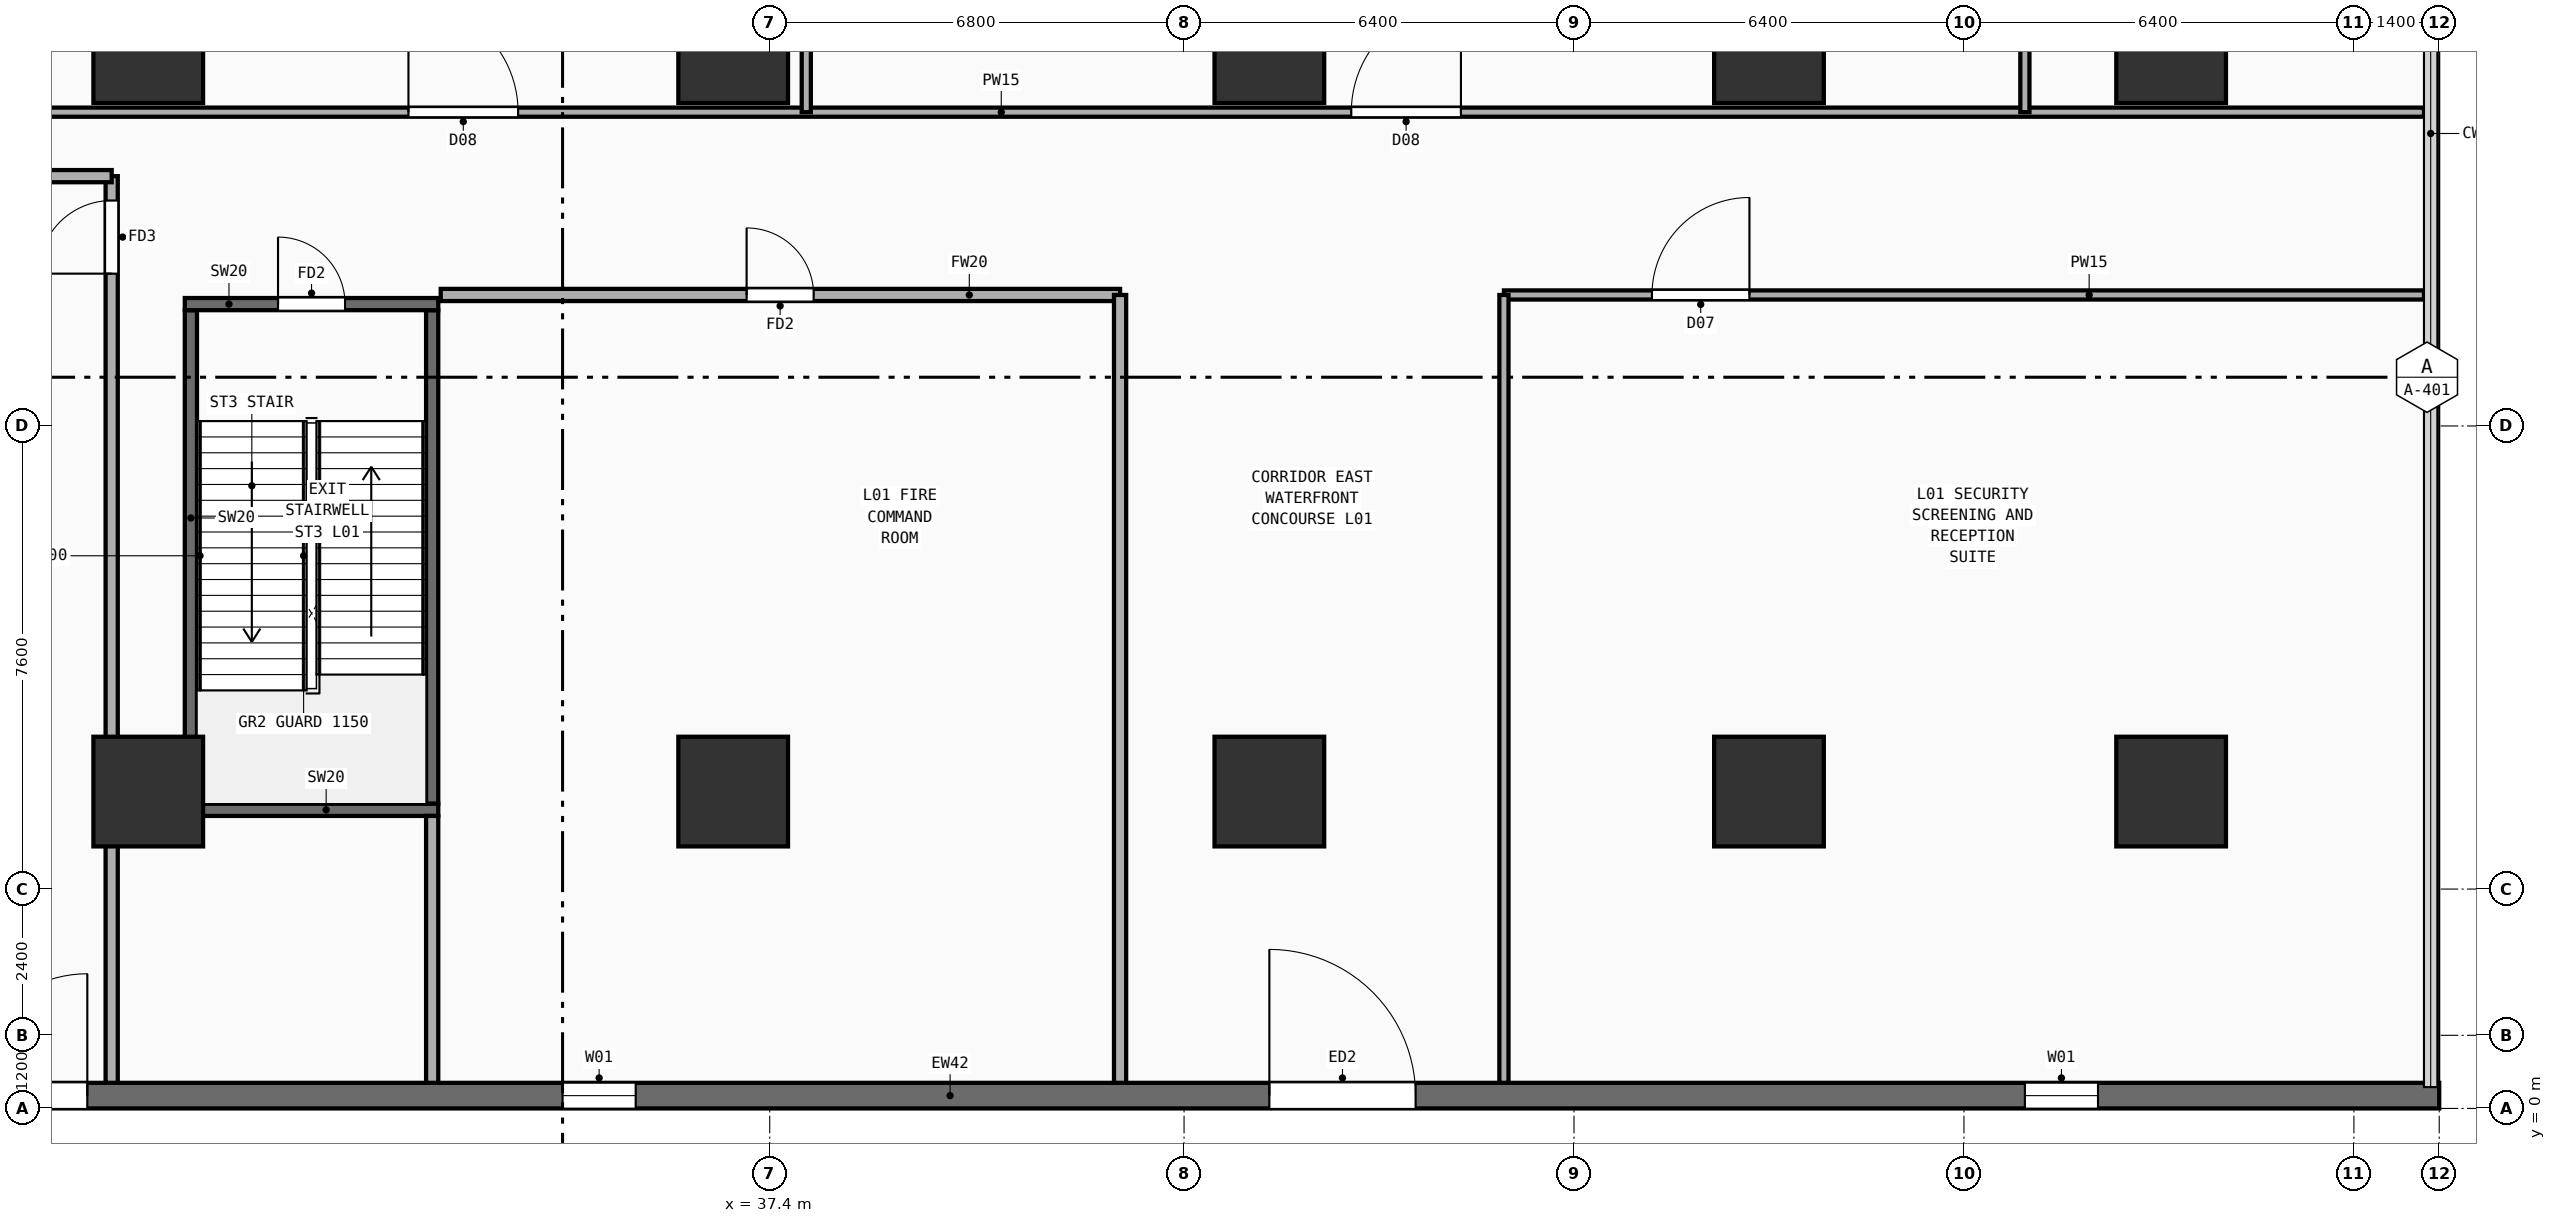
"""IFC4 building model, lengths in metres.
Left out: names, types, materials, properties, quantities, classifications, styles, units other than length and angle.
Written with IfcOpenShell. Run it as: python <this file> out.ifc"""

import sys

from ifc_helpers import new_model, si_unit, direction, frame, frame_2d, origin, origin_2d, place, context, subcontext, project, spatial, rectangle, extrude, element, fill, save


model = new_model("IFC4")
c1 = context("Model", 3, precision=1e-05, world=origin(), true_north=direction((0.0, 1.0)))
c2 = subcontext(c1, "Body", "Model", "MODEL_VIEW")
j1 = project(units=[si_unit("LENGTHUNIT", "METRE"), si_unit("PLANEANGLEUNIT", "RADIAN")], contexts=[c1])
p1 = place(None, origin())
s1 = spatial("IfcSite", under=j1, at=p1, CompositionType="ELEMENT")
p2 = place(p1, origin())
s2 = spatial("IfcBuilding", under=s1, at=p2, CompositionType="ELEMENT")
p3 = place(p2, origin())
s3 = spatial("IfcBuildingStorey", under=s2, at=p3, CompositionType="ELEMENT", Elevation=0.0)
for number, where, z_axis, x_axis in (
    (1, (27.2, 5.2, 0.0), (0.0, 0.0, 1.0), (1.0, 0.0, 0.0)),
    (2, (36.8, 5.2, 0.0), (0.0, 0.0, 1.0), (1.0, 0.0, 0.0)),
    (3, (45.6, 5.2, 0.0), (0.0, 0.0, 1.0), (1.0, 0.0, 0.0)),
    (4, (27.2, 17.4, 0.0), (0.0, 0.0, 1.0), (1.0, 0.0, 0.0)),
    (5, (36.8, 17.4, 0.0), (0.0, 0.0, 1.0), (1.0, 0.0, 0.0)),
    (6, (45.6, 17.4, 0.0), (0.0, 0.0, 1.0), (1.0, 0.0, 0.0)),
    (7, (53.8, 5.2, 0.0), (0.0, 0.0, 1.0), (1.0, 0.0, 0.0)),
    (8, (53.8, 17.4, 0.0), (0.0, 0.0, 1.0), (1.0, 0.0, 0.0)),
    (9, (60.4, 5.2, 0.0), (0.0, 0.0, 1.0), (1.0, 0.0, 0.0)),
    (10, (60.4, 17.4, 0.0), (0.0, 0.0, 1.0), (1.0, 0.0, 0.0)),
):
    element("IfcColumn", number, at=place(p3, frame(where, z_axis=z_axis, x_axis=x_axis)), inside=s3, PredefinedType="COLUMN", context=c2, shape_type="SweptSolid", body=[
        extrude(rectangle(XDim=1.8, YDim=1.8, at=origin_2d()), origin(), (0.0, 0.0, 1.0), 5.26),
    ])
p4 = place(p3, frame((0.0, 0.21, 0.0), z_axis=(0.0, 0.0, 1.0), x_axis=(1.0, 0.0, 0.0)))
e11 = element("IfcWall", 11, at=p4, inside=s3, PredefinedType="SOLIDWALL", context=c2, shape_type="SweptSolid", body=[
    extrude(rectangle(XDim=64.8, YDim=0.42, at=frame_2d((32.4, 0.0))), origin(), (0.0, 0.0, 1.0), 5.26),
])
p5 = place(p4, frame((8.0, 0.0, 0.95)))
e12 = element("IfcOpeningElement", 12, at=p5, cuts=e11, PredefinedType="OPENING", context=c2, shape_type="SweptSolid", body=[
    extrude(rectangle(XDim=1.2, YDim=1.6, at=frame_2d((0.6, 0.8))), frame((0.0, 0.22, 0.0), z_axis=(0.0, -1.0, 0.0), x_axis=(1.0, 0.0, 0.0)), (0.0, 0.0, 1.0), 0.44),
])
p6 = place(p4, frame((16.0, 0.0, 0.95)))
e13 = element("IfcOpeningElement", 13, at=p6, cuts=e11, PredefinedType="OPENING", context=c2, shape_type="SweptSolid", body=[
    extrude(rectangle(XDim=1.2, YDim=1.6, at=frame_2d((0.6, 0.8))), frame((0.0, 0.22, 0.0), z_axis=(0.0, -1.0, 0.0), x_axis=(1.0, 0.0, 0.0)), (0.0, 0.0, 1.0), 0.44),
])
p7 = place(p4, frame((34.0, 0.0, 0.95)))
e14 = element("IfcOpeningElement", 14, at=p7, cuts=e11, PredefinedType="OPENING", context=c2, shape_type="SweptSolid", body=[
    extrude(rectangle(XDim=1.2, YDim=1.6, at=frame_2d((0.6, 0.8))), frame((0.0, 0.22, 0.0), z_axis=(0.0, -1.0, 0.0), x_axis=(1.0, 0.0, 0.0)), (0.0, 0.0, 1.0), 0.44),
])
p8 = place(p4, frame((58.0, 0.0, 0.95)))
e15 = element("IfcOpeningElement", 15, at=p8, cuts=e11, PredefinedType="OPENING", context=c2, shape_type="SweptSolid", body=[
    extrude(rectangle(XDim=1.2, YDim=1.6, at=frame_2d((0.6, 0.8))), frame((0.0, 0.22, 0.0), z_axis=(0.0, -1.0, 0.0), x_axis=(1.0, 0.0, 0.0)), (0.0, 0.0, 1.0), 0.44),
])
p9 = place(p4, frame((24.2, 0.0, 0.0)))
e16 = element("IfcOpeningElement", 16, at=p9, cuts=e11, PredefinedType="OPENING", context=c2, shape_type="SweptSolid", body=[
    extrude(rectangle(XDim=2.0, YDim=2.5, at=frame_2d((1.0, 1.25))), frame((0.0, 0.22, 0.0), z_axis=(0.0, -1.0, 0.0), x_axis=(1.0, 0.0, 0.0)), (0.0, 0.0, 1.0), 0.44),
])
p10 = place(p4, frame((45.6, 0.0, 0.0)))
e17 = element("IfcOpeningElement", 17, at=p10, cuts=e11, PredefinedType="OPENING", context=c2, shape_type="SweptSolid", body=[
    extrude(rectangle(XDim=2.4, YDim=2.7, at=frame_2d((1.2, 1.35))), frame((0.0, 0.22, 0.0), z_axis=(0.0, -1.0, 0.0), x_axis=(1.0, 0.0, 0.0)), (0.0, 0.0, 1.0), 0.44),
])
for number, where, z_axis, x_axis in (
    (18, (27.9, 5.0, 0.0), (0.0, 0.0, 1.0), (0.0, 1.0, 0.0)),
    (19, (31.86, 5.0, 0.0), (0.0, 0.0, 1.0), (0.0, 1.0, 0.0)),
):
    element("IfcWall", number, at=place(p3, frame(where, z_axis=z_axis, x_axis=x_axis)), inside=s3, PredefinedType="SHEAR", context=c2, shape_type="SweptSolid", body=[
        extrude(rectangle(XDim=8.1, YDim=0.2, at=frame_2d((4.05, 0.0))), origin(), (0.0, 0.0, 1.0), 5.26),
    ])
p11 = place(p3, frame((27.8, 4.9, 0.0), z_axis=(0.0, 0.0, 1.0), x_axis=(1.0, 0.0, 0.0)))
e20 = element("IfcWall", 20, at=p11, inside=s3, PredefinedType="SHEAR", context=c2, shape_type="SweptSolid", body=[
    extrude(rectangle(XDim=4.16, YDim=0.2, at=frame_2d((2.08, 0.0))), origin(), (0.0, 0.0, 1.0), 5.26),
])
p12 = place(p3, frame((27.8, 13.2, 0.0), z_axis=(0.0, 0.0, 1.0), x_axis=(1.0, 0.0, 0.0)))
e21 = element("IfcWall", 21, at=p12, inside=s3, PredefinedType="SHEAR", context=c2, shape_type="SweptSolid", body=[
    extrude(rectangle(XDim=4.16, YDim=0.2, at=frame_2d((2.08, 0.0))), origin(), (0.0, 0.0, 1.0), 5.26),
])
p13 = place(p12, frame((1.53, 0.0, 0.0)))
e22 = element("IfcOpeningElement", 22, at=p13, cuts=e21, PredefinedType="OPENING", context=c2, shape_type="SweptSolid", body=[
    extrude(rectangle(XDim=1.1, YDim=2.2, at=frame_2d((0.55, 1.1))), frame((0.0, 0.11, 0.0), z_axis=(0.0, -1.0, 0.0), x_axis=(1.0, 0.0, 0.0)), (0.0, 0.0, 1.0), 0.22),
])
p14 = place(p3, frame((26.6, 0.42, 0.0), z_axis=(0.0, 0.0, 1.0), x_axis=(0.0, 1.0, 0.0)))
e23 = element("IfcWall", 23, at=p14, inside=s3, PredefinedType="PARTITIONING", context=c2, shape_type="SweptSolid", body=[
    extrude(rectangle(XDim=14.88, YDim=0.2, at=frame_2d((7.44, 0.0))), origin(), (0.0, 0.0, 1.0), 5.26),
])
p15 = place(p14, frame((13.28, 0.0, 0.0)))
e24 = element("IfcOpeningElement", 24, at=p15, cuts=e23, PredefinedType="OPENING", context=c2, shape_type="SweptSolid", body=[
    extrude(rectangle(XDim=1.2, YDim=2.25, at=frame_2d((0.6, 1.125))), frame((0.0, 0.11, 0.0), z_axis=(0.0, -1.0, 0.0), x_axis=(1.0, 0.0, 0.0)), (0.0, 0.0, 1.0), 0.22),
])
p16 = place(p3, frame((20.8, 15.3, 0.0), z_axis=(0.0, 0.0, 1.0), x_axis=(1.0, 0.0, 0.0)))
e25 = element("IfcWall", 25, at=p16, inside=s3, PredefinedType="PARTITIONING", context=c2, shape_type="SweptSolid", body=[
    extrude(rectangle(XDim=5.8, YDim=0.2, at=frame_2d((2.9, 0.0))), origin(), (0.0, 0.0, 1.0), 4.76),
])
p17 = place(p3, frame((23.65, 16.35, 0.0), z_axis=(0.0, 0.0, 1.0), x_axis=(1.0, 0.0, 0.0)))
e26 = element("IfcWall", 26, at=p17, inside=s3, PredefinedType="PARTITIONING", context=c2, shape_type="SweptSolid", body=[
    extrude(rectangle(XDim=40.9, YDim=0.15, at=frame_2d((20.45, 0.0))), origin(), (0.0, 0.0, 1.0), 5.26),
])
p18 = place(p17, frame((7.821, 0.0, 0.0)))
e27 = element("IfcOpeningElement", 27, at=p18, cuts=e26, PredefinedType="OPENING", context=c2, shape_type="SweptSolid", body=[
    extrude(rectangle(XDim=1.8, YDim=2.4, at=frame_2d((0.9, 1.2))), frame((0.0, 0.085, 0.0), z_axis=(0.0, -1.0, 0.0), x_axis=(1.0, 0.0, 0.0)), (0.0, 0.0, 1.0), 0.17),
])
p19 = place(p17, frame((23.294, 0.0, 0.0)))
e28 = element("IfcOpeningElement", 28, at=p19, cuts=e26, PredefinedType="OPENING", context=c2, shape_type="SweptSolid", body=[
    extrude(rectangle(XDim=1.8, YDim=2.4, at=frame_2d((0.9, 1.2))), frame((0.0, 0.085, 0.0), z_axis=(0.0, -1.0, 0.0), x_axis=(1.0, 0.0, 0.0)), (0.0, 0.0, 1.0), 0.17),
])
p20 = place(p3, frame((38.0, 16.35, 0.0), z_axis=(0.0, 0.0, 1.0), x_axis=(0.0, 1.0, 0.0)))
e29 = element("IfcWall", 29, at=p20, inside=s3, PredefinedType="PARTITIONING", context=c2, shape_type="SweptSolid", body=[
    extrude(rectangle(XDim=15.05, YDim=0.15, at=frame_2d((7.525, 0.0))), origin(), (0.0, 0.0, 1.0), 5.26),
])
p21 = place(p3, frame((32.0, 13.35, 0.0), z_axis=(0.0, 0.0, 1.0), x_axis=(1.0, 0.0, 0.0)))
e30 = element("IfcWall", 30, at=p21, inside=s3, PredefinedType="PARTITIONING", context=c2, shape_type="SweptSolid", body=[
    extrude(rectangle(XDim=11.15, YDim=0.2, at=frame_2d((5.575, 0.0))), origin(), (0.0, 0.0, 1.0), 4.76),
])
p22 = place(p21, frame((5.021, 0.0, 0.0)))
e31 = element("IfcOpeningElement", 31, at=p22, cuts=e30, PredefinedType="OPENING", context=c2, shape_type="SweptSolid", body=[
    extrude(rectangle(XDim=1.1, YDim=2.2, at=frame_2d((0.55, 1.1))), frame((0.0, 0.11, 0.0), z_axis=(0.0, -1.0, 0.0), x_axis=(1.0, 0.0, 0.0)), (0.0, 0.0, 1.0), 0.22),
])
p23 = place(p3, frame((31.86, 0.42, 0.0), z_axis=(0.0, 0.0, 1.0), x_axis=(0.0, 1.0, 0.0)))
e32 = element("IfcWall", 32, at=p23, inside=s3, PredefinedType="PARTITIONING", context=c2, shape_type="SweptSolid", body=[
    extrude(rectangle(XDim=4.38, YDim=0.2, at=frame_2d((2.19, 0.0))), origin(), (0.0, 0.0, 1.0), 5.26),
])
p24 = place(p3, frame((43.15, 0.42, 0.0), z_axis=(0.0, 0.0, 1.0), x_axis=(0.0, 1.0, 0.0)))
e33 = element("IfcWall", 33, at=p24, inside=s3, PredefinedType="PARTITIONING", context=c2, shape_type="SweptSolid", body=[
    extrude(rectangle(XDim=12.93, YDim=0.2, at=frame_2d((6.465, 0.0))), origin(), (0.0, 0.0, 1.0), 5.26),
])
p25 = place(p3, frame((49.45, 13.35, 0.0), z_axis=(0.0, 0.0, 1.0), x_axis=(1.0, 0.0, 0.0)))
e34 = element("IfcWall", 34, at=p25, inside=s3, PredefinedType="PARTITIONING", context=c2, shape_type="SweptSolid", body=[
    extrude(rectangle(XDim=15.1, YDim=0.15, at=frame_2d((7.55, 0.0))), origin(), (0.0, 0.0, 1.0), 4.76),
])
p26 = place(p25, frame((2.429, 0.0, 0.0)))
e35 = element("IfcOpeningElement", 35, at=p26, cuts=e34, PredefinedType="OPENING", context=c2, shape_type="SweptSolid", body=[
    extrude(rectangle(XDim=1.6, YDim=2.4, at=frame_2d((0.8, 1.2))), frame((0.0, 0.085, 0.0), z_axis=(0.0, -1.0, 0.0), x_axis=(1.0, 0.0, 0.0)), (0.0, 0.0, 1.0), 0.17),
])
p27 = place(p3, frame((49.45, 0.42, 0.0), z_axis=(0.0, 0.0, 1.0), x_axis=(0.0, 1.0, 0.0)))
e36 = element("IfcWall", 36, at=p27, inside=s3, PredefinedType="PARTITIONING", context=c2, shape_type="SweptSolid", body=[
    extrude(rectangle(XDim=12.93, YDim=0.15, at=frame_2d((6.465, 0.0))), origin(), (0.0, 0.0, 1.0), 5.26),
])
p28 = place(p3, frame((58.0, 16.35, 0.0), z_axis=(0.0, 0.0, 1.0), x_axis=(0.0, 1.0, 0.0)))
e37 = element("IfcWall", 37, at=p28, inside=s3, PredefinedType="PARTITIONING", context=c2, shape_type="SweptSolid", body=[
    extrude(rectangle(XDim=15.05, YDim=0.15, at=frame_2d((7.525, 0.0))), origin(), (0.0, 0.0, 1.0), 5.26),
])
p29 = place(p7, origin())
e38 = element("IfcWindow", 38, at=p29, inside=s3, PartitioningType="SINGLE_PANEL", PredefinedType="WINDOW", context=c2, shape_type="SweptSolid", body=[
    extrude(rectangle(XDim=1.2, YDim=1.6, at=frame_2d((0.6, 0.8))), frame((0.0, 0.03, 0.0), z_axis=(0.0, -1.0, 0.0), x_axis=(1.0, 0.0, 0.0)), (0.0, 0.0, 1.0), 0.06),
])
fill(e14, e38)
p30 = place(p8, origin())
e39 = element("IfcWindow", 39, at=p30, inside=s3, PartitioningType="SINGLE_PANEL", PredefinedType="WINDOW", context=c2, shape_type="SweptSolid", body=[
    extrude(rectangle(XDim=1.2, YDim=1.6, at=frame_2d((0.6, 0.8))), frame((0.0, 0.03, 0.0), z_axis=(0.0, -1.0, 0.0), x_axis=(1.0, 0.0, 0.0)), (0.0, 0.0, 1.0), 0.06),
])
fill(e15, e39)
p31 = place(p9, frame((2.0, 0.0, 0.0), z_axis=(0.0, 0.0, 1.0), x_axis=(-1.0, 0.0, 0.0)))
e40 = element("IfcDoor", 40, at=p31, inside=s3, OperationType="SINGLE_SWING_LEFT", PredefinedType="DOOR", context=c2, shape_type="SweptSolid", body=[
    extrude(rectangle(XDim=2.0, YDim=2.5, at=frame_2d((1.0, 1.25))), frame((0.0, 0.025, 0.0), z_axis=(0.0, -1.0, 0.0), x_axis=(1.0, 0.0, 0.0)), (0.0, 0.0, 1.0), 0.05),
])
fill(e16, e40)
p32 = place(p10, frame((2.4, 0.0, 0.0), z_axis=(0.0, 0.0, 1.0), x_axis=(-1.0, 0.0, 0.0)))
e41 = element("IfcDoor", 41, at=p32, inside=s3, OperationType="SINGLE_SWING_RIGHT", PredefinedType="DOOR", context=c2, shape_type="SweptSolid", body=[
    extrude(rectangle(XDim=2.4, YDim=2.7, at=frame_2d((1.2, 1.35))), frame((0.0, 0.025, 0.0), z_axis=(0.0, -1.0, 0.0), x_axis=(1.0, 0.0, 0.0)), (0.0, 0.0, 1.0), 0.05),
])
fill(e17, e41)
p33 = place(p13, frame((1.1, 0.0, 0.0), z_axis=(0.0, 0.0, 1.0), x_axis=(-1.0, 0.0, 0.0)))
e42 = element("IfcDoor", 42, at=p33, inside=s3, OperationType="SINGLE_SWING_RIGHT", PredefinedType="DOOR", context=c2, shape_type="SweptSolid", body=[
    extrude(rectangle(XDim=1.1, YDim=2.2, at=frame_2d((0.55, 1.1))), frame((0.0, 0.025, 0.0), z_axis=(0.0, -1.0, 0.0), x_axis=(1.0, 0.0, 0.0)), (0.0, 0.0, 1.0), 0.05),
])
fill(e22, e42)
p34 = place(p15, origin())
e43 = element("IfcDoor", 43, at=p34, inside=s3, OperationType="SINGLE_SWING_LEFT", PredefinedType="DOOR", context=c2, shape_type="SweptSolid", body=[
    extrude(rectangle(XDim=1.2, YDim=2.25, at=frame_2d((0.6, 1.125))), frame((0.0, 0.025, 0.0), z_axis=(0.0, -1.0, 0.0), x_axis=(1.0, 0.0, 0.0)), (0.0, 0.0, 1.0), 0.05),
])
fill(e24, e43)
p35 = place(p22, origin())
e44 = element("IfcDoor", 44, at=p35, inside=s3, OperationType="SINGLE_SWING_LEFT", PredefinedType="DOOR", context=c2, shape_type="SweptSolid", body=[
    extrude(rectangle(XDim=1.1, YDim=2.2, at=frame_2d((0.55, 1.1))), frame((0.0, 0.025, 0.0), z_axis=(0.0, -1.0, 0.0), x_axis=(1.0, 0.0, 0.0)), (0.0, 0.0, 1.0), 0.05),
])
fill(e31, e44)
p36 = place(p26, origin())
e45 = element("IfcDoor", 45, at=p36, inside=s3, OperationType="SINGLE_SWING_RIGHT", PredefinedType="DOOR", context=c2, shape_type="SweptSolid", body=[
    extrude(rectangle(XDim=1.6, YDim=2.4, at=frame_2d((0.8, 1.2))), frame((0.0, 0.025, 0.0), z_axis=(0.0, -1.0, 0.0), x_axis=(1.0, 0.0, 0.0)), (0.0, 0.0, 1.0), 0.05),
])
fill(e35, e45)
p37 = place(p18, origin())
e46 = element("IfcDoor", 46, at=p37, inside=s3, OperationType="SINGLE_SWING_LEFT", PredefinedType="DOOR", context=c2, shape_type="SweptSolid", body=[
    extrude(rectangle(XDim=1.8, YDim=2.4, at=frame_2d((0.9, 1.2))), frame((0.0, 0.025, 0.0), z_axis=(0.0, -1.0, 0.0), x_axis=(1.0, 0.0, 0.0)), (0.0, 0.0, 1.0), 0.05),
])
fill(e27, e46)
p38 = place(p19, origin())
e47 = element("IfcDoor", 47, at=p38, inside=s3, OperationType="SINGLE_SWING_RIGHT", PredefinedType="DOOR", context=c2, shape_type="SweptSolid", body=[
    extrude(rectangle(XDim=1.8, YDim=2.4, at=frame_2d((0.9, 1.2))), frame((0.0, 0.025, 0.0), z_axis=(0.0, -1.0, 0.0), x_axis=(1.0, 0.0, 0.0)), (0.0, 0.0, 1.0), 0.05),
])
fill(e28, e47)
save(model, sys.argv[1])
